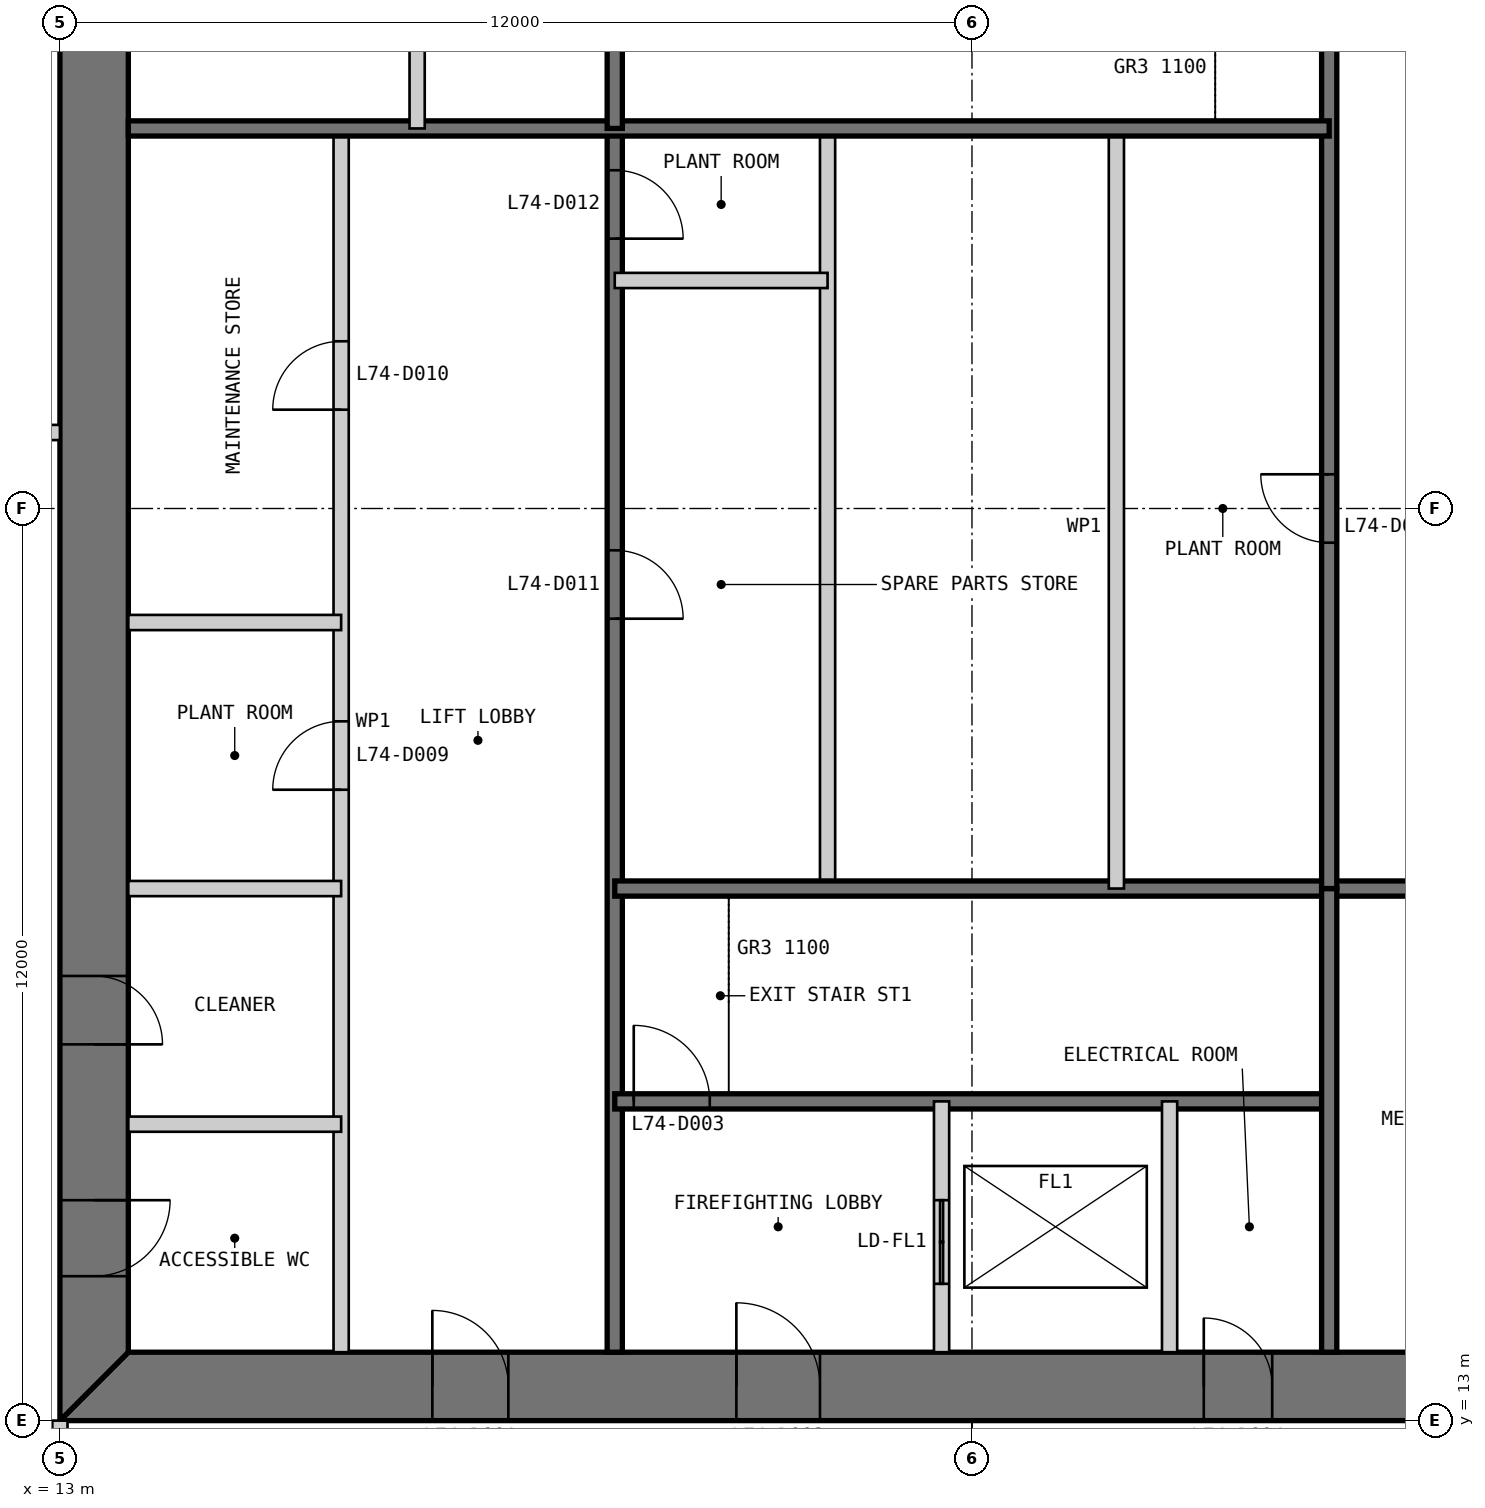
"""IFC4 building model, lengths in metres.
Left out: names, types, materials, properties, quantities, classifications, styles, units other than length and angle.
Written with IfcOpenShell. Run it as: python <this file> out.ifc"""

import sys

from ifc_helpers import new_model, si_unit, direction, frame, frame_2d, origin, place, context, subcontext, project, spatial, polyline, rectangle, outline, extrude, element, fill, save


model = new_model("IFC4")
c1 = context("Model", 3, precision=1e-05, world=origin(), true_north=direction((0.0, 1.0)))
c2 = subcontext(c1, "Body", "Model", "MODEL_VIEW")
j1 = project(units=[si_unit("LENGTHUNIT", "METRE"), si_unit("PLANEANGLEUNIT", "RADIAN")], contexts=[c1])
p1 = place(None, origin())
s1 = spatial("IfcSite", under=j1, at=p1, CompositionType="ELEMENT")
p2 = place(p1, origin())
s2 = spatial("IfcBuilding", under=s1, at=p2, CompositionType="ELEMENT")
p3 = place(p2, frame((0.0, 0.0, 307.8)))
s3 = spatial("IfcBuildingStorey", under=s2, at=p3, CompositionType="ELEMENT", Elevation=307.8)
p4 = place(p3, frame((13.0, 13.45, 0.0), z_axis=(0.0, 0.0, 1.0), x_axis=(1.0, 0.0, 0.0)))
e1 = element("IfcWall", 1, at=p4, inside=s3, PredefinedType="SHEAR", context=c2, shape_type="SweptSolid", body=[
    extrude(outline(polyline([(0.0, -0.45), (24.0, -0.45), (23.1, 0.45), (0.9, 0.45), (0.0, -0.45)])), origin(), (0.0, 0.0, 1.0), 5.75),
])
p5 = place(p4, frame((4.9, 0.0, 0.0)))
e2 = element("IfcOpeningElement", 2, at=p5, cuts=e1, PredefinedType="OPENING", context=c2, shape_type="SweptSolid", body=[
    extrude(rectangle(XDim=1.0, YDim=2.2, at=frame_2d((0.5, 1.1))), frame((0.0, 0.46, 0.0), z_axis=(0.0, -1.0, 0.0), x_axis=(1.0, 0.0, 0.0)), (0.0, 0.0, 1.0), 0.92),
])
p6 = place(p4, frame((8.9, 0.0, 0.0)))
e3 = element("IfcOpeningElement", 3, at=p6, cuts=e1, PredefinedType="OPENING", context=c2, shape_type="SweptSolid", body=[
    extrude(rectangle(XDim=1.1, YDim=2.2, at=frame_2d((0.55, 1.1))), frame((0.0, 0.46, 0.0), z_axis=(0.0, -1.0, 0.0), x_axis=(1.0, 0.0, 0.0)), (0.0, 0.0, 1.0), 0.92),
])
p7 = place(p4, frame((15.05, 0.0, 0.0)))
e4 = element("IfcOpeningElement", 4, at=p7, cuts=e1, PredefinedType="OPENING", context=c2, shape_type="SweptSolid", body=[
    extrude(rectangle(XDim=0.9, YDim=2.2, at=frame_2d((0.45, 1.1))), frame((0.0, 0.46, 0.0), z_axis=(0.0, -1.0, 0.0), x_axis=(1.0, 0.0, 0.0)), (0.0, 0.0, 1.0), 0.92),
])
p8 = place(p4, frame((17.9, 0.0, 0.0)))
e5 = element("IfcOpeningElement", 5, at=p8, cuts=e1, PredefinedType="OPENING", context=c2, shape_type="SweptSolid", body=[
    extrude(rectangle(XDim=1.0, YDim=2.2, at=frame_2d((0.5, 1.1))), frame((0.0, 0.46, 0.0), z_axis=(0.0, -1.0, 0.0), x_axis=(1.0, 0.0, 0.0)), (0.0, 0.0, 1.0), 0.92),
])
p9 = place(p4, frame((21.4, 0.0, 0.0)))
e6 = element("IfcOpeningElement", 6, at=p9, cuts=e1, PredefinedType="OPENING", context=c2, shape_type="SweptSolid", body=[
    extrude(rectangle(XDim=1.0, YDim=2.2, at=frame_2d((0.5, 1.1))), frame((0.0, 0.46, 0.0), z_axis=(0.0, -1.0, 0.0), x_axis=(1.0, 0.0, 0.0)), (0.0, 0.0, 1.0), 0.92),
])
p10 = place(p3, frame((13.45, 36.1, 0.0), z_axis=(0.0, 0.0, 1.0), x_axis=(0.0, -1.0, 0.0)))
e7 = element("IfcWall", 7, at=p10, inside=s3, PredefinedType="SHEAR", context=c2, shape_type="SweptSolid", body=[
    extrude(outline(polyline([(-0.9, -0.45), (23.1, -0.45), (22.2, 0.45), (0.0, 0.45), (-0.9, -0.45)])), origin(), (0.0, 0.0, 1.0), 5.75),
])
p11 = place(p10, frame((20.2, 0.0, 0.0)))
e8 = element("IfcOpeningElement", 8, at=p11, cuts=e7, PredefinedType="OPENING", context=c2, shape_type="SweptSolid", body=[
    extrude(rectangle(XDim=1.0, YDim=2.2, at=frame_2d((0.5, 1.1))), frame((0.0, 0.46, 0.0), z_axis=(0.0, -1.0, 0.0), x_axis=(1.0, 0.0, 0.0)), (0.0, 0.0, 1.0), 0.92),
])
p12 = place(p10, frame((17.25, 0.0, 0.0)))
e9 = element("IfcOpeningElement", 9, at=p12, cuts=e7, PredefinedType="OPENING", context=c2, shape_type="SweptSolid", body=[
    extrude(rectangle(XDim=0.9, YDim=2.2, at=frame_2d((0.45, 1.1))), frame((0.0, 0.46, 0.0), z_axis=(0.0, -1.0, 0.0), x_axis=(1.0, 0.0, 0.0)), (0.0, 0.0, 1.0), 0.92),
])
p13 = place(p3, frame((16.7, 13.9, 0.0), z_axis=(0.0, 0.0, 1.0), x_axis=(0.0, 1.0, 0.0)))
e10 = element("IfcWall", 10, at=p13, inside=s3, PredefinedType="PARTITIONING", context=c2, shape_type="SweptSolid", body=[
    extrude(rectangle(XDim=16.1, YDim=0.2, at=frame_2d((8.05, 0.0))), origin(), (0.0, 0.0, 1.0), 5.75),
])
p14 = place(p13, frame((7.4, 0.0, 0.0)))
e11 = element("IfcOpeningElement", 11, at=p14, cuts=e10, PredefinedType="OPENING", context=c2, shape_type="SweptSolid", body=[
    extrude(rectangle(XDim=0.9, YDim=2.2, at=frame_2d((0.45, 1.1))), frame((0.0, 0.11, 0.0), z_axis=(0.0, -1.0, 0.0), x_axis=(1.0, 0.0, 0.0)), (0.0, 0.0, 1.0), 0.22),
])
p15 = place(p13, frame((12.4, 0.0, 0.0)))
e12 = element("IfcOpeningElement", 12, at=p15, cuts=e10, PredefinedType="OPENING", context=c2, shape_type="SweptSolid", body=[
    extrude(rectangle(XDim=0.9, YDim=2.2, at=frame_2d((0.45, 1.1))), frame((0.0, 0.11, 0.0), z_axis=(0.0, -1.0, 0.0), x_axis=(1.0, 0.0, 0.0)), (0.0, 0.0, 1.0), 0.22),
])
p16 = place(p3, frame((20.3, 13.9, 0.0), z_axis=(0.0, 0.0, 1.0), x_axis=(0.0, 1.0, 0.0)))
e13 = element("IfcWall", 13, at=p16, inside=s3, PredefinedType="SOLIDWALL", context=c2, shape_type="SweptSolid", body=[
    extrude(rectangle(XDim=16.1, YDim=0.2, at=frame_2d((8.05, 0.0))), origin(), (0.0, 0.0, 1.0), 5.75),
])
p17 = place(p16, frame((9.65, 0.0, 0.0)))
e14 = element("IfcOpeningElement", 14, at=p17, cuts=e13, PredefinedType="OPENING", context=c2, shape_type="SweptSolid", body=[
    extrude(rectangle(XDim=0.9, YDim=2.2, at=frame_2d((0.45, 1.1))), frame((0.0, 0.11, 0.0), z_axis=(0.0, -1.0, 0.0), x_axis=(1.0, 0.0, 0.0)), (0.0, 0.0, 1.0), 0.22),
])
p18 = place(p16, frame((14.65, 0.0, 0.0)))
e15 = element("IfcOpeningElement", 15, at=p18, cuts=e13, PredefinedType="OPENING", context=c2, shape_type="SweptSolid", body=[
    extrude(rectangle(XDim=0.9, YDim=2.2, at=frame_2d((0.45, 1.1))), frame((0.0, 0.11, 0.0), z_axis=(0.0, -1.0, 0.0), x_axis=(1.0, 0.0, 0.0)), (0.0, 0.0, 1.0), 0.22),
])
p19 = place(p3, frame((23.1, 20.0, 0.0), z_axis=(0.0, 0.0, 1.0), x_axis=(0.0, 1.0, 0.0)))
e16 = element("IfcWall", 16, at=p19, inside=s3, PredefinedType="PARTITIONING", context=c2, shape_type="SweptSolid", body=[
    extrude(rectangle(XDim=10.0, YDim=0.2, at=frame_2d((5.0, 0.0))), origin(), (0.0, 0.0, 1.0), 5.75),
])
p20 = place(p3, frame((20.3, 17.2, 0.0), z_axis=(0.0, 0.0, 1.0), x_axis=(1.0, 0.0, 0.0)))
e17 = element("IfcWall", 17, at=p20, inside=s3, PredefinedType="SOLIDWALL", context=c2, shape_type="SweptSolid", body=[
    extrude(rectangle(XDim=9.4, YDim=0.2, at=frame_2d((4.7, 0.0))), origin(), (0.0, 0.0, 1.0), 5.75),
])
p21 = place(p20, frame((0.25, 0.0, 0.0)))
e18 = element("IfcOpeningElement", 18, at=p21, cuts=e17, PredefinedType="OPENING", context=c2, shape_type="SweptSolid", body=[
    extrude(rectangle(XDim=1.0, YDim=2.2, at=frame_2d((0.5, 1.1))), frame((0.0, 0.11, 0.0), z_axis=(0.0, -1.0, 0.0), x_axis=(1.0, 0.0, 0.0)), (0.0, 0.0, 1.0), 0.22),
])
p22 = place(p3, frame((20.3, 20.0, 0.0), z_axis=(0.0, 0.0, 1.0), x_axis=(1.0, 0.0, 0.0)))
e19 = element("IfcWall", 19, at=p22, inside=s3, PredefinedType="SOLIDWALL", context=c2, shape_type="SweptSolid", body=[
    extrude(rectangle(XDim=15.8, YDim=0.2, at=frame_2d((7.9, 0.0))), origin(), (0.0, 0.0, 1.0), 5.75),
])
p23 = place(p3, frame((24.6, 13.9, 0.0), z_axis=(0.0, 0.0, 1.0), x_axis=(0.0, 1.0, 0.0)))
e20 = element("IfcWall", 20, at=p23, inside=s3, PredefinedType="PARTITIONING", context=c2, shape_type="SweptSolid", body=[
    extrude(rectangle(XDim=3.3, YDim=0.2, at=frame_2d((1.65, 0.0))), origin(), (0.0, 0.0, 1.0), 5.75),
])
p24 = place(p23, frame((0.9, 0.0, 0.0)))
e21 = element("IfcOpeningElement", 21, at=p24, cuts=e20, PredefinedType="OPENING", context=c2, shape_type="SweptSolid", body=[
    extrude(rectangle(XDim=1.1, YDim=2.2, at=frame_2d((0.55, 1.1))), frame((0.0, 0.11, 0.0), z_axis=(0.0, -1.0, 0.0), x_axis=(1.0, 0.0, 0.0)), (0.0, 0.0, 1.0), 0.22),
])
p25 = place(p3, frame((27.6, 13.9, 0.0), z_axis=(0.0, 0.0, 1.0), x_axis=(0.0, 1.0, 0.0)))
e22 = element("IfcWall", 22, at=p25, inside=s3, PredefinedType="PARTITIONING", context=c2, shape_type="SweptSolid", body=[
    extrude(rectangle(XDim=3.3, YDim=0.2, at=frame_2d((1.65, 0.0))), origin(), (0.0, 0.0, 1.0), 5.75),
])
p26 = place(p3, frame((29.7, 13.9, 0.0), z_axis=(0.0, 0.0, 1.0), x_axis=(0.0, 1.0, 0.0)))
e23 = element("IfcWall", 23, at=p26, inside=s3, PredefinedType="SOLIDWALL", context=c2, shape_type="SweptSolid", body=[
    extrude(rectangle(XDim=6.1, YDim=0.2, at=frame_2d((3.05, 0.0))), origin(), (0.0, 0.0, 1.0), 5.75),
])
for number, where, z_axis, x_axis in (
    (24, (13.9, 16.9, 0.0), (0.0, 0.0, 1.0), (1.0, 0.0, 0.0)),
    (25, (13.9, 20.0, 0.0), (0.0, 0.0, 1.0), (1.0, 0.0, 0.0)),
    (26, (13.9, 23.5, 0.0), (0.0, 0.0, 1.0), (1.0, 0.0, 0.0)),
    (27, (20.3, 28.0, 0.0), (0.0, 0.0, 1.0), (1.0, 0.0, 0.0)),
):
    element("IfcWall", number, at=place(p3, frame(where, z_axis=z_axis, x_axis=x_axis)), inside=s3, PredefinedType="PARTITIONING", context=c2, shape_type="SweptSolid", body=[
        extrude(rectangle(XDim=2.8, YDim=0.2, at=frame_2d((1.4, 0.0))), origin(), (0.0, 0.0, 1.0), 5.75),
    ])
p27 = place(p3, frame((29.7, 36.1, 0.0), z_axis=(0.0, 0.0, 1.0), x_axis=(0.0, -1.0, 0.0)))
e28 = element("IfcWall", 28, at=p27, inside=s3, PredefinedType="SOLIDWALL", context=c2, shape_type="SweptSolid", body=[
    extrude(rectangle(XDim=16.1, YDim=0.2, at=frame_2d((8.05, 0.0))), origin(), (0.0, 0.0, 1.0), 5.75),
])
p28 = place(p27, frame((10.65, 0.0, 0.0)))
e29 = element("IfcOpeningElement", 29, at=p28, cuts=e28, PredefinedType="OPENING", context=c2, shape_type="SweptSolid", body=[
    extrude(rectangle(XDim=0.9, YDim=2.2, at=frame_2d((0.45, 1.1))), frame((0.0, 0.11, 0.0), z_axis=(0.0, -1.0, 0.0), x_axis=(1.0, 0.0, 0.0)), (0.0, 0.0, 1.0), 0.22),
])
p29 = place(p3, frame((26.9, 30.0, 0.0), z_axis=(0.0, 0.0, 1.0), x_axis=(0.0, -1.0, 0.0)))
e30 = element("IfcWall", 30, at=p29, inside=s3, PredefinedType="PARTITIONING", context=c2, shape_type="SweptSolid", body=[
    extrude(rectangle(XDim=10.0, YDim=0.2, at=frame_2d((5.0, 0.0))), origin(), (0.0, 0.0, 1.0), 5.75),
])
p30 = place(p3, frame((29.7, 30.0, 0.0), z_axis=(0.0, 0.0, 1.0), x_axis=(-1.0, 0.0, 0.0)))
e31 = element("IfcWall", 31, at=p30, inside=s3, PredefinedType="SOLIDWALL", context=c2, shape_type="SweptSolid", body=[
    extrude(rectangle(XDim=15.8, YDim=0.2, at=frame_2d((7.9, 0.0))), origin(), (0.0, 0.0, 1.0), 5.75),
])
p31 = place(p3, frame((20.3, 36.1, 0.0), z_axis=(0.0, 0.0, 1.0), x_axis=(0.0, -1.0, 0.0)))
e32 = element("IfcWall", 32, at=p31, inside=s3, PredefinedType="SOLIDWALL", context=c2, shape_type="SweptSolid", body=[
    extrude(rectangle(XDim=6.1, YDim=0.2, at=frame_2d((3.05, 0.0))), origin(), (0.0, 0.0, 1.0), 5.75),
])
p32 = place(p3, frame((17.7, 36.1, 0.0), z_axis=(0.0, 0.0, 1.0), x_axis=(0.0, -1.0, 0.0)))
e33 = element("IfcWall", 33, at=p32, inside=s3, PredefinedType="PARTITIONING", context=c2, shape_type="SweptSolid", body=[
    extrude(rectangle(XDim=6.1, YDim=0.2, at=frame_2d((3.05, 0.0))), origin(), (0.0, 0.0, 1.0), 5.75),
])
p33 = place(p3, frame((13.0, 10.6, 0.0), z_axis=(0.0, 0.0, 1.0), x_axis=(0.0, 1.0, 0.0)))
e34 = element("IfcWall", 34, at=p33, inside=s3, PredefinedType="PARTITIONING", context=c2, shape_type="SweptSolid", body=[
    extrude(rectangle(XDim=2.4, YDim=0.2, at=frame_2d((1.2, 0.0))), origin(), (0.0, 0.0, 1.0), 4.802),
])
p34 = place(p3, frame((0.0, 26.0, 0.0), z_axis=(0.0, 0.0, 1.0), x_axis=(1.0, 0.0, 0.0)))
e35 = element("IfcWall", 35, at=p34, inside=s3, PredefinedType="PARTITIONING", context=c2, shape_type="SweptSolid", body=[
    extrude(rectangle(XDim=13.0, YDim=0.2, at=frame_2d((6.5, 0.0))), origin(), (0.0, 0.0, 1.0), 5.75),
])
p35 = place(p34, frame((5.6, 0.0, 0.0)))
e36 = element("IfcOpeningElement", 36, at=p35, cuts=e35, PredefinedType="OPENING", context=c2, shape_type="SweptSolid", body=[
    extrude(rectangle(XDim=1.8, YDim=2.4, at=frame_2d((0.9, 1.2))), frame((0.0, 0.11, 0.0), z_axis=(0.0, -1.0, 0.0), x_axis=(1.0, 0.0, 0.0)), (0.0, 0.0, 1.0), 0.22),
])
p36 = place(p5, origin())
e37 = element("IfcDoor", 37, at=p36, inside=s3, OperationType="SINGLE_SWING_LEFT", PredefinedType="DOOR", context=c2, shape_type="SweptSolid", body=[
    extrude(rectangle(XDim=1.0, YDim=2.2, at=frame_2d((0.5, 1.1))), frame((0.0, 0.025, 0.0), z_axis=(0.0, -1.0, 0.0), x_axis=(1.0, 0.0, 0.0)), (0.0, 0.0, 1.0), 0.05),
    extrude(outline(polyline([(0.0, 0.0), (0.04, 0.0), (0.04, 2.16), (0.96, 2.16), (0.96, 0.0), (1.0, 0.0), (1.0, 2.2), (0.0, 2.2), (0.0, 0.0)])), frame((0.0, 0.3, 0.0), z_axis=(0.0, -1.0, 0.0), x_axis=(1.0, 0.0, 0.0)), (0.0, 0.0, 1.0), 0.6),
])
fill(e2, e37)
p37 = place(p6, origin())
e38 = element("IfcDoor", 38, at=p37, inside=s3, OperationType="SINGLE_SWING_LEFT", PredefinedType="DOOR", context=c2, shape_type="SweptSolid", body=[
    extrude(rectangle(XDim=1.1, YDim=2.2, at=frame_2d((0.55, 1.1))), frame((0.0, 0.025, 0.0), z_axis=(0.0, -1.0, 0.0), x_axis=(1.0, 0.0, 0.0)), (0.0, 0.0, 1.0), 0.05),
    extrude(outline(polyline([(0.0, 0.0), (0.04, 0.0), (0.04, 2.16), (1.06, 2.16), (1.06, 0.0), (1.1, 0.0), (1.1, 2.2), (0.0, 2.2), (0.0, 0.0)])), frame((0.0, 0.3, 0.0), z_axis=(0.0, -1.0, 0.0), x_axis=(1.0, 0.0, 0.0)), (0.0, 0.0, 1.0), 0.6),
])
fill(e3, e38)
p38 = place(p21, origin())
e39 = element("IfcDoor", 39, at=p38, inside=s3, OperationType="SINGLE_SWING_LEFT", PredefinedType="DOOR", context=c2, shape_type="SweptSolid", body=[
    extrude(rectangle(XDim=1.0, YDim=2.2, at=frame_2d((0.5, 1.1))), frame((0.0, 0.025, 0.0), z_axis=(0.0, -1.0, 0.0), x_axis=(1.0, 0.0, 0.0)), (0.0, 0.0, 1.0), 0.05),
])
fill(e18, e39)
p39 = place(p7, origin())
e40 = element("IfcDoor", 40, at=p39, inside=s3, OperationType="SINGLE_SWING_LEFT", PredefinedType="DOOR", context=c2, shape_type="SweptSolid", body=[
    extrude(rectangle(XDim=0.9, YDim=2.2, at=frame_2d((0.45, 1.1))), frame((0.0, 0.025, 0.0), z_axis=(0.0, -1.0, 0.0), x_axis=(1.0, 0.0, 0.0)), (0.0, 0.0, 1.0), 0.05),
    extrude(outline(polyline([(0.0, 0.0), (0.04, 0.0), (0.04, 2.16), (0.86, 2.16), (0.86, 0.0), (0.9, 0.0), (0.9, 2.2), (0.0, 2.2), (0.0, 0.0)])), frame((0.0, 0.3, 0.0), z_axis=(0.0, -1.0, 0.0), x_axis=(1.0, 0.0, 0.0)), (0.0, 0.0, 1.0), 0.6),
])
fill(e4, e40)
p40 = place(p11, origin())
e41 = element("IfcDoor", 41, at=p40, inside=s3, OperationType="SINGLE_SWING_LEFT", PredefinedType="DOOR", context=c2, shape_type="SweptSolid", body=[
    extrude(rectangle(XDim=1.0, YDim=2.2, at=frame_2d((0.5, 1.1))), frame((0.0, 0.025, 0.0), z_axis=(0.0, -1.0, 0.0), x_axis=(1.0, 0.0, 0.0)), (0.0, 0.0, 1.0), 0.05),
    extrude(outline(polyline([(0.0, 0.0), (0.04, 0.0), (0.04, 2.16), (0.96, 2.16), (0.96, 0.0), (1.0, 0.0), (1.0, 2.2), (0.0, 2.2), (0.0, 0.0)])), frame((0.0, 0.3, 0.0), z_axis=(0.0, -1.0, 0.0), x_axis=(1.0, 0.0, 0.0)), (0.0, 0.0, 1.0), 0.6),
])
fill(e8, e41)
p41 = place(p12, origin())
e42 = element("IfcDoor", 42, at=p41, inside=s3, OperationType="SINGLE_SWING_RIGHT", PredefinedType="DOOR", context=c2, shape_type="SweptSolid", body=[
    extrude(rectangle(XDim=0.9, YDim=2.2, at=frame_2d((0.45, 1.1))), frame((0.0, 0.025, 0.0), z_axis=(0.0, -1.0, 0.0), x_axis=(1.0, 0.0, 0.0)), (0.0, 0.0, 1.0), 0.05),
    extrude(outline(polyline([(0.0, 0.0), (0.04, 0.0), (0.04, 2.16), (0.86, 2.16), (0.86, 0.0), (0.9, 0.0), (0.9, 2.2), (0.0, 2.2), (0.0, 0.0)])), frame((0.0, 0.3, 0.0), z_axis=(0.0, -1.0, 0.0), x_axis=(1.0, 0.0, 0.0)), (0.0, 0.0, 1.0), 0.6),
])
fill(e9, e42)
p42 = place(p14, origin())
e43 = element("IfcDoor", 43, at=p42, inside=s3, OperationType="SINGLE_SWING_LEFT", PredefinedType="DOOR", context=c2, shape_type="SweptSolid", body=[
    extrude(rectangle(XDim=0.9, YDim=2.2, at=frame_2d((0.45, 1.1))), frame((0.0, 0.025, 0.0), z_axis=(0.0, -1.0, 0.0), x_axis=(1.0, 0.0, 0.0)), (0.0, 0.0, 1.0), 0.05),
])
fill(e11, e43)
p43 = place(p15, origin())
e44 = element("IfcDoor", 44, at=p43, inside=s3, OperationType="SINGLE_SWING_LEFT", PredefinedType="DOOR", context=c2, shape_type="SweptSolid", body=[
    extrude(rectangle(XDim=0.9, YDim=2.2, at=frame_2d((0.45, 1.1))), frame((0.0, 0.025, 0.0), z_axis=(0.0, -1.0, 0.0), x_axis=(1.0, 0.0, 0.0)), (0.0, 0.0, 1.0), 0.05),
])
fill(e12, e44)
p44 = place(p17, frame((0.9, 0.0, 0.0), z_axis=(0.0, 0.0, 1.0), x_axis=(-1.0, 0.0, 0.0)))
e45 = element("IfcDoor", 45, at=p44, inside=s3, OperationType="SINGLE_SWING_RIGHT", PredefinedType="DOOR", context=c2, shape_type="SweptSolid", body=[
    extrude(rectangle(XDim=0.9, YDim=2.2, at=frame_2d((0.45, 1.1))), frame((0.0, 0.025, 0.0), z_axis=(0.0, -1.0, 0.0), x_axis=(1.0, 0.0, 0.0)), (0.0, 0.0, 1.0), 0.05),
])
fill(e14, e45)
p45 = place(p18, frame((0.9, 0.0, 0.0), z_axis=(0.0, 0.0, 1.0), x_axis=(-1.0, 0.0, 0.0)))
e46 = element("IfcDoor", 46, at=p45, inside=s3, OperationType="SINGLE_SWING_RIGHT", PredefinedType="DOOR", context=c2, shape_type="SweptSolid", body=[
    extrude(rectangle(XDim=0.9, YDim=2.2, at=frame_2d((0.45, 1.1))), frame((0.0, 0.025, 0.0), z_axis=(0.0, -1.0, 0.0), x_axis=(1.0, 0.0, 0.0)), (0.0, 0.0, 1.0), 0.05),
])
fill(e15, e46)
p46 = place(p28, frame((0.9, 0.0, 0.0), z_axis=(0.0, 0.0, 1.0), x_axis=(-1.0, 0.0, 0.0)))
e47 = element("IfcDoor", 47, at=p46, inside=s3, OperationType="SINGLE_SWING_RIGHT", PredefinedType="DOOR", context=c2, shape_type="SweptSolid", body=[
    extrude(rectangle(XDim=0.9, YDim=2.2, at=frame_2d((0.45, 1.1))), frame((0.0, 0.025, 0.0), z_axis=(0.0, -1.0, 0.0), x_axis=(1.0, 0.0, 0.0)), (0.0, 0.0, 1.0), 0.05),
])
fill(e29, e47)
p47 = place(p24, origin())
e48 = element("IfcDoor", 48, at=p47, inside=s3, OperationType="DOUBLE_DOOR_SLIDING", PredefinedType="DOOR", context=c2, shape_type="SweptSolid", body=[
    extrude(rectangle(XDim=1.1, YDim=2.2, at=frame_2d((0.55, 1.1))), frame((0.0, 0.025, 0.0), z_axis=(0.0, -1.0, 0.0), x_axis=(1.0, 0.0, 0.0)), (0.0, 0.0, 1.0), 0.05),
])
fill(e21, e48)
save(model, sys.argv[1])
